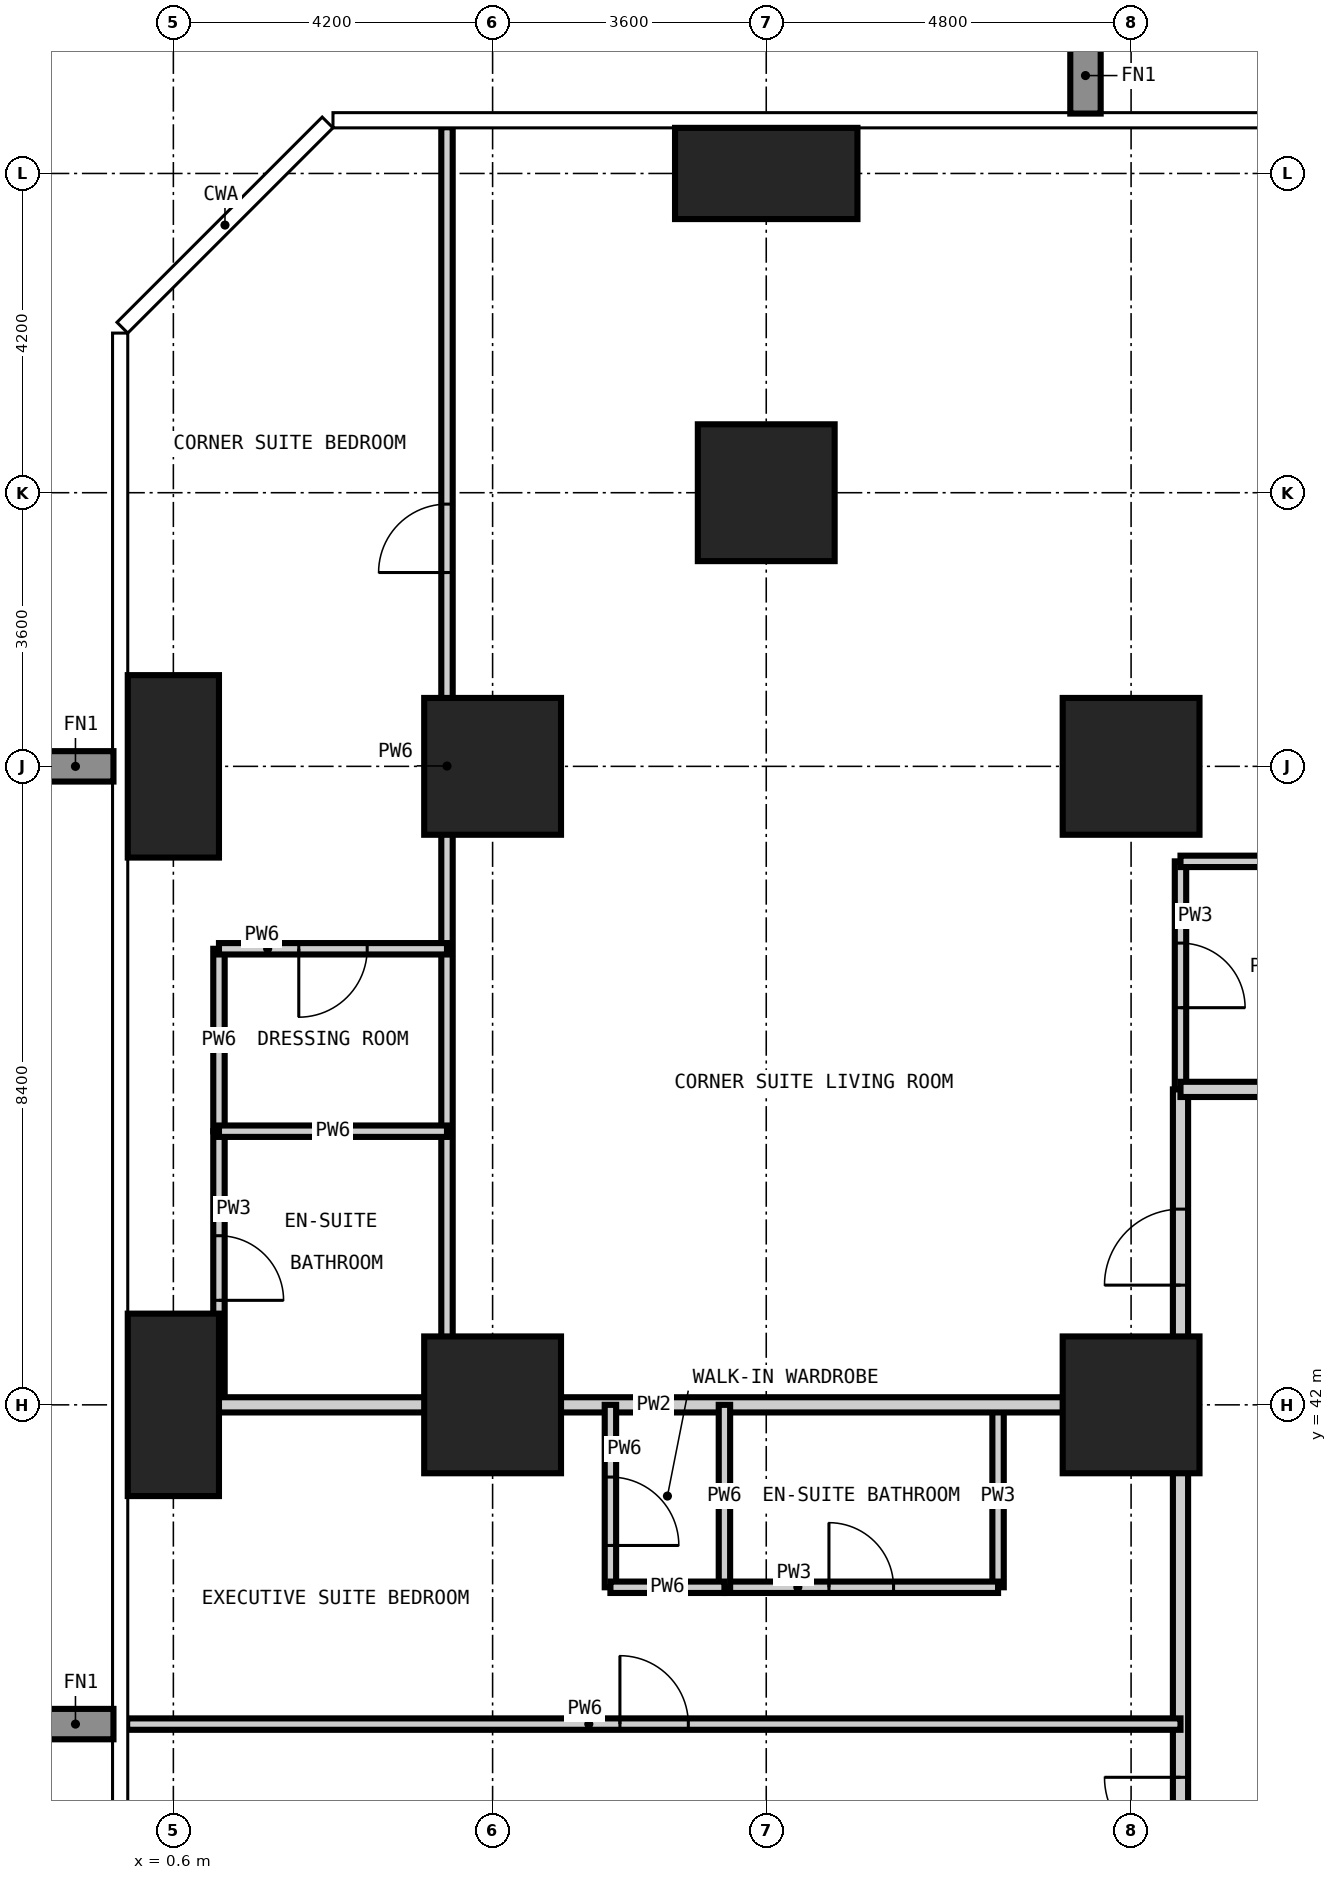
"""IFC4 building model, lengths in metres.
Left out: names, types, materials, properties, quantities, classifications, styles, units other than length and angle.
Written with IfcOpenShell. Run it as: python <this file> out.ifc"""

import sys

from ifc_helpers import new_model, si_unit, direction, frame, frame_2d, origin, origin_2d, place, context, subcontext, project, spatial, rectangle, extrude, element, fill, save


model = new_model("IFC4")
c1 = context("Model", 3, precision=1e-05, world=origin(), true_north=direction((0.0, 1.0)))
c2 = subcontext(c1, "Body", "Model", "MODEL_VIEW")
j1 = project(units=[si_unit("LENGTHUNIT", "METRE"), si_unit("PLANEANGLEUNIT", "RADIAN")], contexts=[c1])
p1 = place(None, origin())
s1 = spatial("IfcSite", under=j1, at=p1, CompositionType="ELEMENT")
p2 = place(p1, origin())
s2 = spatial("IfcBuilding", under=s1, at=p2, CompositionType="ELEMENT")
p3 = place(p2, frame((0.0, 0.0, 55.8)))
s3 = spatial("IfcBuildingStorey", under=s2, at=p3, CompositionType="ELEMENT", Elevation=55.8)
for number, where, z_axis, x_axis in (
    (1, (0.6, 42.0, -0.35), (0.0, 0.0, 1.0), (1.0, 0.0, 0.0)),
    (2, (0.6, 50.4, -0.35), (0.0, 0.0, 1.0), (1.0, 0.0, 0.0)),
):
    element("IfcColumn", number, at=place(p3, frame(where, z_axis=z_axis, x_axis=x_axis)), inside=s3, PredefinedType="COLUMN", context=c2, shape_type="SweptSolid", body=[
        extrude(rectangle(XDim=1.2, YDim=2.4, at=origin_2d()), origin(), (0.0, 0.0, 1.0), 3.6),
    ])
for number, where, z_axis, x_axis in (
    (3, (4.8, 42.0, -0.35), (0.0, 0.0, 1.0), (1.0, 0.0, 0.0)),
    (4, (4.8, 50.4, -0.35), (0.0, 0.0, 1.0), (1.0, 0.0, 0.0)),
    (5, (8.4, 54.0, -0.35), (0.0, 0.0, 1.0), (1.0, 0.0, 0.0)),
):
    element("IfcColumn", number, at=place(p3, frame(where, z_axis=z_axis, x_axis=x_axis)), inside=s3, PredefinedType="COLUMN", context=c2, shape_type="SweptSolid", body=[
        extrude(rectangle(XDim=1.8, YDim=1.8, at=origin_2d()), origin(), (0.0, 0.0, 1.0), 3.6),
    ])
p4 = place(p3, frame((8.4, 58.2, -0.35), z_axis=(0.0, 0.0, 1.0), x_axis=(1.0, 0.0, 0.0)))
e6 = element("IfcColumn", 6, at=p4, inside=s3, PredefinedType="COLUMN", context=c2, shape_type="SweptSolid", body=[
    extrude(rectangle(XDim=2.4, YDim=1.2, at=origin_2d()), origin(), (0.0, 0.0, 1.0), 3.6),
])
for number, where, z_axis, x_axis in (
    (7, (13.2, 42.0, -0.35), (0.0, 0.0, 1.0), (1.0, 0.0, 0.0)),
    (8, (13.2, 50.4, -0.35), (0.0, 0.0, 1.0), (1.0, 0.0, 0.0)),
):
    element("IfcColumn", number, at=place(p3, frame(where, z_axis=z_axis, x_axis=x_axis)), inside=s3, PredefinedType="COLUMN", context=c2, shape_type="SweptSolid", body=[
        extrude(rectangle(XDim=1.8, YDim=1.8, at=origin_2d()), origin(), (0.0, 0.0, 1.0), 3.6),
    ])
p5 = place(p3, frame((1.2, 42.0, 0.0), z_axis=(0.0, 0.0, 1.0), x_axis=(0.0, 1.0, 0.0)))
e9 = element("IfcWall", 9, at=p5, inside=s3, PredefinedType="PARTITIONING", context=c2, shape_type="SweptSolid", body=[
    extrude(rectangle(XDim=3.6, YDim=0.15, at=frame_2d((1.8, 0.0))), origin(), (0.0, 0.0, 1.0), 3.25),
])
p6 = place(p5, frame((1.375, 0.0, 0.0)))
e10 = element("IfcOpeningElement", 10, at=p6, cuts=e9, PredefinedType="OPENING", context=c2, shape_type="SweptSolid", body=[
    extrude(rectangle(XDim=0.85, YDim=2.1, at=frame_2d((0.425, 1.05))), frame((0.0, 0.085, 0.0), z_axis=(0.0, -1.0, 0.0), x_axis=(1.0, 0.0, 0.0)), (0.0, 0.0, 1.0), 0.17),
])
p7 = place(p3, frame((11.45, 39.6, 0.0), z_axis=(0.0, 0.0, 1.0), x_axis=(0.0, 1.0, 0.0)))
e11 = element("IfcWall", 11, at=p7, inside=s3, PredefinedType="PARTITIONING", context=c2, shape_type="SweptSolid", body=[
    extrude(rectangle(XDim=2.4, YDim=0.15, at=frame_2d((1.2, 0.0))), origin(), (0.0, 0.0, 1.0), 3.25),
])
p8 = place(p3, frame((13.85, 46.15, 0.0), z_axis=(0.0, 0.0, 1.0), x_axis=(0.0, 1.0, 0.0)))
e12 = element("IfcWall", 12, at=p8, inside=s3, PredefinedType="PARTITIONING", context=c2, shape_type="SweptSolid", body=[
    extrude(rectangle(XDim=3.0, YDim=0.15, at=frame_2d((1.5, 0.0))), origin(), (0.0, 0.0, 1.0), 3.25),
])
p9 = place(p8, frame((1.075, 0.0, 0.0)))
e13 = element("IfcOpeningElement", 13, at=p9, cuts=e12, PredefinedType="OPENING", context=c2, shape_type="SweptSolid", body=[
    extrude(rectangle(XDim=0.85, YDim=2.1, at=frame_2d((0.425, 1.05))), frame((0.0, 0.085, 0.0), z_axis=(0.0, -1.0, 0.0), x_axis=(1.0, 0.0, 0.0)), (0.0, 0.0, 1.0), 0.17),
])
p10 = place(p3, frame((7.85, 39.6, 0.0), z_axis=(0.0, 0.0, 1.0), x_axis=(1.0, 0.0, 0.0)))
e14 = element("IfcWall", 14, at=p10, inside=s3, PredefinedType="PARTITIONING", context=c2, shape_type="SweptSolid", body=[
    extrude(rectangle(XDim=3.6, YDim=0.15, at=frame_2d((1.8, 0.0))), origin(), (0.0, 0.0, 1.0), 3.25),
])
p11 = place(p10, frame((1.375, 0.0, 0.0)))
e15 = element("IfcOpeningElement", 15, at=p11, cuts=e14, PredefinedType="OPENING", context=c2, shape_type="SweptSolid", body=[
    extrude(rectangle(XDim=0.85, YDim=2.1, at=frame_2d((0.425, 1.05))), frame((0.0, 0.085, 0.0), z_axis=(0.0, -1.0, 0.0), x_axis=(1.0, 0.0, 0.0)), (0.0, 0.0, 1.0), 0.17),
])
p12 = place(p3, frame((13.85, 49.15, 0.0), z_axis=(0.0, 0.0, 1.0), x_axis=(1.0, 0.0, 0.0)))
e16 = element("IfcWall", 16, at=p12, inside=s3, PredefinedType="PARTITIONING", context=c2, shape_type="SweptSolid", body=[
    extrude(rectangle(XDim=2.95, YDim=0.15, at=frame_2d((1.475, 0.0))), origin(), (0.0, 0.0, 1.0), 3.25),
])
p13 = place(p3, frame((13.85, 13.85, 0.0), z_axis=(0.0, 0.0, 1.0), x_axis=(0.0, 1.0, 0.0)))
e17 = element("IfcWall", 17, at=p13, inside=s3, PredefinedType="PARTITIONING", context=c2, shape_type="SweptSolid", body=[
    extrude(rectangle(XDim=32.3, YDim=0.2, at=frame_2d((16.15, 0.0))), origin(), (0.0, 0.0, 1.0), 3.25),
])
p14 = place(p13, frame((5.45, 0.0, 0.0)))
e18 = element("IfcOpeningElement", 18, at=p14, cuts=e17, PredefinedType="OPENING", context=c2, shape_type="SweptSolid", body=[
    extrude(rectangle(XDim=1.0, YDim=2.2, at=frame_2d((0.5, 1.1))), frame((0.0, 0.11, 0.0), z_axis=(0.0, -1.0, 0.0), x_axis=(1.0, 0.0, 0.0)), (0.0, 0.0, 1.0), 0.22),
])
p15 = place(p13, frame((13.85, 0.0, 0.0)))
e19 = element("IfcOpeningElement", 19, at=p15, cuts=e17, PredefinedType="OPENING", context=c2, shape_type="SweptSolid", body=[
    extrude(rectangle(XDim=1.0, YDim=2.2, at=frame_2d((0.5, 1.1))), frame((0.0, 0.11, 0.0), z_axis=(0.0, -1.0, 0.0), x_axis=(1.0, 0.0, 0.0)), (0.0, 0.0, 1.0), 0.22),
])
p16 = place(p13, frame((22.25, 0.0, 0.0)))
e20 = element("IfcOpeningElement", 20, at=p16, cuts=e17, PredefinedType="OPENING", context=c2, shape_type="SweptSolid", body=[
    extrude(rectangle(XDim=1.0, YDim=2.2, at=frame_2d((0.5, 1.1))), frame((0.0, 0.11, 0.0), z_axis=(0.0, -1.0, 0.0), x_axis=(1.0, 0.0, 0.0)), (0.0, 0.0, 1.0), 0.22),
])
p17 = place(p13, frame((0.975, 0.0, 0.0)))
e21 = element("IfcOpeningElement", 21, at=p17, cuts=e17, PredefinedType="OPENING", context=c2, shape_type="SweptSolid", body=[
    extrude(rectangle(XDim=1.0, YDim=2.2, at=frame_2d((0.5, 1.1))), frame((0.0, 0.11, 0.0), z_axis=(0.0, -1.0, 0.0), x_axis=(1.0, 0.0, 0.0)), (0.0, 0.0, 1.0), 0.22),
])
p18 = place(p13, frame((29.725, 0.0, 0.0)))
e22 = element("IfcOpeningElement", 22, at=p18, cuts=e17, PredefinedType="OPENING", context=c2, shape_type="SweptSolid", body=[
    extrude(rectangle(XDim=1.0, YDim=2.2, at=frame_2d((0.5, 1.1))), frame((0.0, 0.11, 0.0), z_axis=(0.0, -1.0, 0.0), x_axis=(1.0, 0.0, 0.0)), (0.0, 0.0, 1.0), 0.22),
])
p19 = place(p3, frame((13.85, 46.15, 0.0), z_axis=(0.0, 0.0, 1.0), x_axis=(1.0, 0.0, 0.0)))
e23 = element("IfcWall", 23, at=p19, inside=s3, PredefinedType="PARTITIONING", context=c2, shape_type="SweptSolid", body=[
    extrude(rectangle(XDim=31.7, YDim=0.2, at=frame_2d((15.85, 0.0))), origin(), (0.0, 0.0, 1.0), 3.25),
])
p20 = place(p19, frame((6.65, 0.0, 0.0)))
e24 = element("IfcOpeningElement", 24, at=p20, cuts=e23, PredefinedType="OPENING", context=c2, shape_type="SweptSolid", body=[
    extrude(rectangle(XDim=1.0, YDim=2.2, at=frame_2d((0.5, 1.1))), frame((0.0, 0.11, 0.0), z_axis=(0.0, -1.0, 0.0), x_axis=(1.0, 0.0, 0.0)), (0.0, 0.0, 1.0), 0.22),
])
p21 = place(p19, frame((15.05, 0.0, 0.0)))
e25 = element("IfcOpeningElement", 25, at=p21, cuts=e23, PredefinedType="OPENING", context=c2, shape_type="SweptSolid", body=[
    extrude(rectangle(XDim=1.0, YDim=2.2, at=frame_2d((0.5, 1.1))), frame((0.0, 0.11, 0.0), z_axis=(0.0, -1.0, 0.0), x_axis=(1.0, 0.0, 0.0)), (0.0, 0.0, 1.0), 0.22),
])
p22 = place(p19, frame((23.45, 0.0, 0.0)))
e26 = element("IfcOpeningElement", 26, at=p22, cuts=e23, PredefinedType="OPENING", context=c2, shape_type="SweptSolid", body=[
    extrude(rectangle(XDim=1.0, YDim=2.2, at=frame_2d((0.5, 1.1))), frame((0.0, 0.11, 0.0), z_axis=(0.0, -1.0, 0.0), x_axis=(1.0, 0.0, 0.0)), (0.0, 0.0, 1.0), 0.22),
])
p23 = place(p3, frame((-0.008, 42.0, 0.0), z_axis=(0.0, 0.0, 1.0), x_axis=(1.0, 0.0, 0.0)))
e27 = element("IfcWall", 27, at=p23, inside=s3, PredefinedType="PARTITIONING", context=c2, shape_type="SweptSolid", body=[
    extrude(rectangle(XDim=13.858, YDim=0.2, at=frame_2d((6.929, 0.0))), origin(), (0.0, 0.0, 1.0), 3.25),
])
p24 = place(p3, frame((1.2, 45.6, 0.0), z_axis=(0.0, 0.0, 1.0), x_axis=(0.0, 1.0, 0.0)))
e28 = element("IfcWall", 28, at=p24, inside=s3, PredefinedType="PARTITIONING", context=c2, shape_type="SweptSolid", body=[
    extrude(rectangle(XDim=2.4, YDim=0.15, at=frame_2d((1.2, 0.0))), origin(), (0.0, 0.0, 1.0), 3.25),
])
p25 = place(p3, frame((4.2, 42.0, 0.0), z_axis=(0.0, 0.0, 1.0), x_axis=(0.0, 1.0, 0.0)))
e29 = element("IfcWall", 29, at=p25, inside=s3, PredefinedType="PARTITIONING", context=c2, shape_type="SweptSolid", body=[
    extrude(rectangle(XDim=16.808, YDim=0.15, at=frame_2d((8.404, 0.0))), origin(), (0.0, 0.0, 1.0), 3.25),
])
p26 = place(p25, frame((10.95, 0.0, 0.0)))
e30 = element("IfcOpeningElement", 30, at=p26, cuts=e29, PredefinedType="OPENING", context=c2, shape_type="SweptSolid", body=[
    extrude(rectangle(XDim=0.9, YDim=2.1, at=frame_2d((0.45, 1.05))), frame((0.0, 0.085, 0.0), z_axis=(0.0, -1.0, 0.0), x_axis=(1.0, 0.0, 0.0)), (0.0, 0.0, 1.0), 0.17),
])
p27 = place(p3, frame((6.35, 39.6, 0.0), z_axis=(0.0, 0.0, 1.0), x_axis=(0.0, 1.0, 0.0)))
e31 = element("IfcWall", 31, at=p27, inside=s3, PredefinedType="PARTITIONING", context=c2, shape_type="SweptSolid", body=[
    extrude(rectangle(XDim=2.4, YDim=0.15, at=frame_2d((1.2, 0.0))), origin(), (0.0, 0.0, 1.0), 3.25),
])
p28 = place(p27, frame((0.55, 0.0, 0.0)))
e32 = element("IfcOpeningElement", 32, at=p28, cuts=e31, PredefinedType="OPENING", context=c2, shape_type="SweptSolid", body=[
    extrude(rectangle(XDim=0.9, YDim=2.1, at=frame_2d((0.45, 1.05))), frame((0.0, 0.085, 0.0), z_axis=(0.0, -1.0, 0.0), x_axis=(1.0, 0.0, 0.0)), (0.0, 0.0, 1.0), 0.17),
])
p29 = place(p3, frame((7.85, 39.6, 0.0), z_axis=(0.0, 0.0, 1.0), x_axis=(0.0, 1.0, 0.0)))
e33 = element("IfcWall", 33, at=p29, inside=s3, PredefinedType="PARTITIONING", context=c2, shape_type="SweptSolid", body=[
    extrude(rectangle(XDim=2.4, YDim=0.15, at=frame_2d((1.2, 0.0))), origin(), (0.0, 0.0, 1.0), 3.25),
])
p30 = place(p3, frame((-0.008, 37.8, 0.0), z_axis=(0.0, 0.0, 1.0), x_axis=(1.0, 0.0, 0.0)))
e34 = element("IfcWall", 34, at=p30, inside=s3, PredefinedType="PARTITIONING", context=c2, shape_type="SweptSolid", body=[
    extrude(rectangle(XDim=13.858, YDim=0.15, at=frame_2d((6.929, 0.0))), origin(), (0.0, 0.0, 1.0), 3.25),
])
p31 = place(p30, frame((6.483, 0.0, 0.0)))
e35 = element("IfcOpeningElement", 35, at=p31, cuts=e34, PredefinedType="OPENING", context=c2, shape_type="SweptSolid", body=[
    extrude(rectangle(XDim=0.9, YDim=2.1, at=frame_2d((0.45, 1.05))), frame((0.0, 0.085, 0.0), z_axis=(0.0, -1.0, 0.0), x_axis=(1.0, 0.0, 0.0)), (0.0, 0.0, 1.0), 0.17),
])
p32 = place(p3, frame((6.35, 39.6, 0.0), z_axis=(0.0, 0.0, 1.0), x_axis=(1.0, 0.0, 0.0)))
e36 = element("IfcWall", 36, at=p32, inside=s3, PredefinedType="PARTITIONING", context=c2, shape_type="SweptSolid", body=[
    extrude(rectangle(XDim=1.5, YDim=0.15, at=frame_2d((0.75, 0.0))), origin(), (0.0, 0.0, 1.0), 3.25),
])
p33 = place(p3, frame((1.2, 45.6, 0.0), z_axis=(0.0, 0.0, 1.0), x_axis=(1.0, 0.0, 0.0)))
e37 = element("IfcWall", 37, at=p33, inside=s3, PredefinedType="PARTITIONING", context=c2, shape_type="SweptSolid", body=[
    extrude(rectangle(XDim=3.0, YDim=0.15, at=frame_2d((1.5, 0.0))), origin(), (0.0, 0.0, 1.0), 3.25),
])
p34 = place(p3, frame((1.2, 48.0, 0.0), z_axis=(0.0, 0.0, 1.0), x_axis=(1.0, 0.0, 0.0)))
e38 = element("IfcWall", 38, at=p34, inside=s3, PredefinedType="PARTITIONING", context=c2, shape_type="SweptSolid", body=[
    extrude(rectangle(XDim=3.0, YDim=0.15, at=frame_2d((1.5, 0.0))), origin(), (0.0, 0.0, 1.0), 3.25),
])
p35 = place(p34, frame((1.05, 0.0, 0.0)))
e39 = element("IfcOpeningElement", 39, at=p35, cuts=e38, PredefinedType="OPENING", context=c2, shape_type="SweptSolid", body=[
    extrude(rectangle(XDim=0.9, YDim=2.1, at=frame_2d((0.45, 1.05))), frame((0.0, 0.085, 0.0), z_axis=(0.0, -1.0, 0.0), x_axis=(1.0, 0.0, 0.0)), (0.0, 0.0, 1.0), 0.17),
])
p36 = place(p16, origin())
e40 = element("IfcDoor", 40, at=p36, inside=s3, OperationType="SINGLE_SWING_RIGHT", PredefinedType="DOOR", context=c2, shape_type="SweptSolid", body=[
    extrude(rectangle(XDim=1.0, YDim=2.2, at=frame_2d((0.5, 1.1))), frame((0.0, 0.025, 0.0), z_axis=(0.0, -1.0, 0.0), x_axis=(1.0, 0.0, 0.0)), (0.0, 0.0, 1.0), 0.05),
])
fill(e20, e40)
p37 = place(p31, origin())
e41 = element("IfcDoor", 41, at=p37, inside=s3, OperationType="SINGLE_SWING_LEFT", PredefinedType="DOOR", context=c2, shape_type="SweptSolid", body=[
    extrude(rectangle(XDim=0.9, YDim=2.1, at=frame_2d((0.45, 1.05))), frame((0.0, 0.025, 0.0), z_axis=(0.0, -1.0, 0.0), x_axis=(1.0, 0.0, 0.0)), (0.0, 0.0, 1.0), 0.05),
])
fill(e35, e41)
p38 = place(p11, origin())
e42 = element("IfcDoor", 42, at=p38, inside=s3, OperationType="SINGLE_SWING_LEFT", PredefinedType="DOOR", context=c2, shape_type="SweptSolid", body=[
    extrude(rectangle(XDim=0.85, YDim=2.1, at=frame_2d((0.425, 1.05))), frame((0.0, 0.025, 0.0), z_axis=(0.0, -1.0, 0.0), x_axis=(1.0, 0.0, 0.0)), (0.0, 0.0, 1.0), 0.05),
])
fill(e15, e42)
p39 = place(p28, frame((0.9, 0.0, 0.0), z_axis=(0.0, 0.0, 1.0), x_axis=(-1.0, 0.0, 0.0)))
e43 = element("IfcDoor", 43, at=p39, inside=s3, OperationType="SINGLE_SWING_RIGHT", PredefinedType="DOOR", context=c2, shape_type="SweptSolid", body=[
    extrude(rectangle(XDim=0.9, YDim=2.1, at=frame_2d((0.45, 1.05))), frame((0.0, 0.025, 0.0), z_axis=(0.0, -1.0, 0.0), x_axis=(1.0, 0.0, 0.0)), (0.0, 0.0, 1.0), 0.05),
])
fill(e32, e43)
p40 = place(p18, origin())
e44 = element("IfcDoor", 44, at=p40, inside=s3, OperationType="SINGLE_SWING_LEFT", PredefinedType="DOOR", context=c2, shape_type="SweptSolid", body=[
    extrude(rectangle(XDim=1.0, YDim=2.2, at=frame_2d((0.5, 1.1))), frame((0.0, 0.025, 0.0), z_axis=(0.0, -1.0, 0.0), x_axis=(1.0, 0.0, 0.0)), (0.0, 0.0, 1.0), 0.05),
])
fill(e22, e44)
p41 = place(p9, frame((0.85, 0.0, 0.0), z_axis=(0.0, 0.0, 1.0), x_axis=(-1.0, 0.0, 0.0)))
e45 = element("IfcDoor", 45, at=p41, inside=s3, OperationType="SINGLE_SWING_RIGHT", PredefinedType="DOOR", context=c2, shape_type="SweptSolid", body=[
    extrude(rectangle(XDim=0.85, YDim=2.1, at=frame_2d((0.425, 1.05))), frame((0.0, 0.025, 0.0), z_axis=(0.0, -1.0, 0.0), x_axis=(1.0, 0.0, 0.0)), (0.0, 0.0, 1.0), 0.05),
])
fill(e13, e45)
p42 = place(p26, origin())
e46 = element("IfcDoor", 46, at=p42, inside=s3, OperationType="SINGLE_SWING_LEFT", PredefinedType="DOOR", context=c2, shape_type="SweptSolid", body=[
    extrude(rectangle(XDim=0.9, YDim=2.1, at=frame_2d((0.45, 1.05))), frame((0.0, 0.025, 0.0), z_axis=(0.0, -1.0, 0.0), x_axis=(1.0, 0.0, 0.0)), (0.0, 0.0, 1.0), 0.05),
])
fill(e30, e46)
p43 = place(p6, frame((0.85, 0.0, 0.0), z_axis=(0.0, 0.0, 1.0), x_axis=(-1.0, 0.0, 0.0)))
e47 = element("IfcDoor", 47, at=p43, inside=s3, OperationType="SINGLE_SWING_RIGHT", PredefinedType="DOOR", context=c2, shape_type="SweptSolid", body=[
    extrude(rectangle(XDim=0.85, YDim=2.1, at=frame_2d((0.425, 1.05))), frame((0.0, 0.025, 0.0), z_axis=(0.0, -1.0, 0.0), x_axis=(1.0, 0.0, 0.0)), (0.0, 0.0, 1.0), 0.05),
])
fill(e10, e47)
p44 = place(p35, frame((0.9, 0.0, 0.0), z_axis=(0.0, 0.0, 1.0), x_axis=(-1.0, 0.0, 0.0)))
e48 = element("IfcDoor", 48, at=p44, inside=s3, OperationType="SINGLE_SWING_RIGHT", PredefinedType="DOOR", context=c2, shape_type="SweptSolid", body=[
    extrude(rectangle(XDim=0.9, YDim=2.1, at=frame_2d((0.45, 1.05))), frame((0.0, 0.025, 0.0), z_axis=(0.0, -1.0, 0.0), x_axis=(1.0, 0.0, 0.0)), (0.0, 0.0, 1.0), 0.05),
])
fill(e39, e48)
save(model, sys.argv[1])
